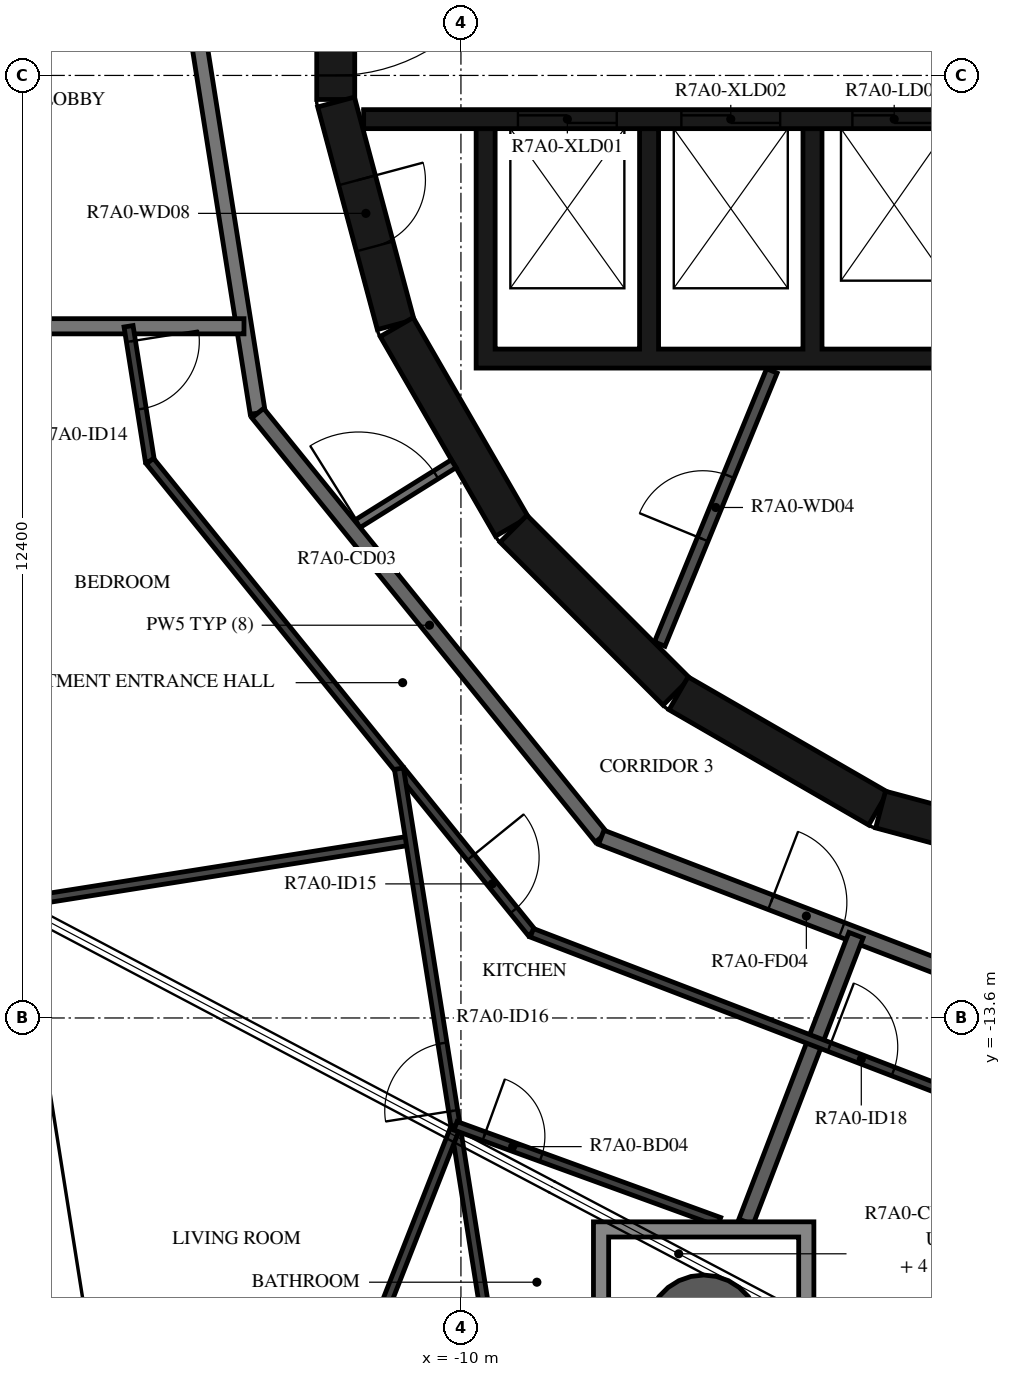
"""IFC4 building model, lengths in metres.
Left out: names, types, materials, properties, quantities, classifications, styles, units other than length and angle.
Written with IfcOpenShell. Run it as: python <this file> out.ifc"""

import sys

from ifc_helpers import new_model, si_unit, direction, frame, frame_2d, origin, origin_2d, place, context, subcontext, project, spatial, polyline, rectangle, hollow_circle, outline, extrude, element, fill, save


model = new_model("IFC4")
c1 = context("Model", 3, precision=1e-05, world=origin(), true_north=direction((0.0, 1.0)))
c2 = subcontext(c1, "Body", "Model", "MODEL_VIEW")
j1 = project(units=[si_unit("LENGTHUNIT", "METRE"), si_unit("PLANEANGLEUNIT", "RADIAN")], contexts=[c1])
p1 = place(None, origin())
s1 = spatial("IfcSite", under=j1, at=p1, CompositionType="ELEMENT")
p2 = place(p1, origin())
s2 = spatial("IfcBuilding", under=s1, at=p2, CompositionType="ELEMENT")
p3 = place(p2, frame((0.0, 0.0, 270.4)))
s3 = spatial("IfcBuildingStorey", under=s2, at=p3, CompositionType="ELEMENT", Elevation=270.4)
p4 = place(p3, frame((-6.807, -17.732, -0.38), z_axis=(0.0, 0.0, 1.0), x_axis=(1.0, 0.0, 0.0)))
e1 = element("IfcColumn", 1, at=p4, inside=s3, PredefinedType="COLUMN", context=c2, shape_type="SweptSolid", body=[
    extrude(hollow_circle(Radius=0.75, WallThickness=0.035, at=origin_2d()), origin(), (0.0, 0.0, 1.0), 3.5),
])
p5 = place(p3, frame((-11.647, 1.516, 0.0), z_axis=(0.0, 0.0, 1.0), x_axis=(0.0, -1.0, 0.0)))
e2 = element("IfcWall", 2, at=p5, inside=s3, PredefinedType="SHEAR", context=c2, shape_type="SweptSolid", body=[
    extrude(rectangle(XDim=3.033, YDim=0.5, at=frame_2d((1.516, 0.0))), origin(), (0.0, 0.0, 1.0), 3.12),
])
p6 = place(p5, frame((0.316, 0.0, 0.0)))
e3 = element("IfcOpeningElement", 3, at=p6, cuts=e2, PredefinedType="OPENING", context=c2, shape_type="SweptSolid", body=[
    extrude(rectangle(XDim=2.4, YDim=2.1, at=frame_2d((1.2, 1.05))), frame((0.0, 0.26, 0.0), z_axis=(0.0, -1.0, 0.0), x_axis=(1.0, 0.0, 0.0)), (0.0, 0.0, 1.0), 0.52),
])
p7 = place(p3, frame((-11.643, -1.55, 0.0), z_axis=(0.0, 0.0, 1.0), x_axis=(0.258734743916, -0.965948410781, 0.0)))
e4 = element("IfcWall", 4, at=p7, inside=s3, PredefinedType="SHEAR", context=c2, shape_type="SweptSolid", body=[
    extrude(rectangle(XDim=3.033, YDim=0.5, at=frame_2d((1.516, 0.0))), origin(), (0.0, 0.0, 1.0), 3.12),
])
p8 = place(p7, frame((1.066, 0.0, 0.0)))
e5 = element("IfcOpeningElement", 5, at=p8, cuts=e4, PredefinedType="OPENING", context=c2, shape_type="SweptSolid", body=[
    extrude(rectangle(XDim=0.9, YDim=2.1, at=frame_2d((0.45, 1.05))), frame((0.0, 0.26, 0.0), z_axis=(0.0, -1.0, 0.0), x_axis=(1.0, 0.0, 0.0)), (0.0, 0.0, 1.0), 0.52),
])
p9 = place(p3, frame((-10.845, -4.51, 0.0), z_axis=(0.0, 0.0, 1.0), x_axis=(0.500087131594, -0.865975092491, 0.0)))
e6 = element("IfcWall", 6, at=p9, inside=s3, PredefinedType="SHEAR", context=c2, shape_type="SweptSolid", body=[
    extrude(rectangle(XDim=3.033, YDim=0.5, at=frame_2d((1.516, 0.0))), origin(), (0.0, 0.0, 1.0), 3.12),
])
p10 = place(p3, frame((-9.308, -7.164, 0.0), z_axis=(0.0, 0.0, 1.0), x_axis=(0.707106781187, -0.707106781187, 0.0)))
e7 = element("IfcWall", 7, at=p10, inside=s3, PredefinedType="SHEAR", context=c2, shape_type="SweptSolid", body=[
    extrude(rectangle(XDim=3.032, YDim=0.5, at=frame_2d((1.516, 0.0))), origin(), (0.0, 0.0, 1.0), 3.12),
])
for number, where, z_axis, x_axis in (
    (8, (-7.137, -9.329, 0.0), (0.0, 0.0, 1.0), (0.866, -0.5, 0.0)),
    (9, (-4.479, -10.858, 0.0), (0.0, 0.0, 1.0), (0.966, -0.259, 0.0)),
):
    element("IfcWall", number, at=place(p3, frame(where, z_axis=z_axis, x_axis=x_axis)), inside=s3, PredefinedType="SHEAR", context=c2, shape_type="SweptSolid", body=[
        extrude(rectangle(XDim=3.033, YDim=0.5, at=frame_2d((1.516, 0.0))), origin(), (0.0, 0.0, 1.0), 3.12),
    ])
p11 = place(p3, origin())
e10 = element("IfcWall", 10, at=p11, inside=s3, PredefinedType="SHEAR", context=c2, shape_type="SweptSolid", body=[
    extrude(outline(polyline([(9.8, -5.05), (9.8, -4.8), (9.8, -1.9), (9.55, -1.9), (9.55, -4.8), (7.65, -4.8), (7.65, -1.9), (7.4, -1.9), (7.4, -4.8), (5.5, -4.8), (5.5, -1.9), (5.25, -1.9), (5.25, -4.8), (3.35, -4.8), (3.35, -1.9), (3.1, -1.9), (3.1, -4.8), (1.2, -4.8), (1.2, -1.9), (0.95, -1.9), (0.95, -4.8), (-0.95, -4.8), (-0.95, -1.9), (-1.2, -1.9), (-1.2, -4.8), (-3.1, -4.8), (-3.1, -1.9), (-3.35, -1.9), (-3.35, -4.8), (-5.25, -4.8), (-5.25, -1.9), (-5.5, -1.9), (-5.5, -4.8), (-7.4, -4.8), (-7.4, -1.9), (-7.65, -1.9), (-7.65, -4.8), (-9.55, -4.8), (-9.55, -1.9), (-9.8, -1.9), (-9.8, -4.8), (-9.8, -5.05), (9.8, -5.05)])), origin(), (0.0, 0.0, 1.0), 3.12),
])
p12 = place(p3, frame((-11.28, -1.775, 0.0), z_axis=(0.0, 0.0, 1.0), x_axis=(1.0, 0.0, 0.0)))
e11 = element("IfcWall", 11, at=p12, inside=s3, PredefinedType="SHEAR", context=c2, shape_type="SweptSolid", body=[
    extrude(rectangle(XDim=14.38, YDim=0.25, at=frame_2d((7.19, 0.0))), origin(), (0.0, 0.0, 1.0), 3.12),
])
p13 = place(p12, frame((2.03, 0.0, 0.0)))
e12 = element("IfcOpeningElement", 12, at=p13, cuts=e11, PredefinedType="OPENING", context=c2, shape_type="SweptSolid", body=[
    extrude(rectangle(XDim=1.3, YDim=2.1, at=frame_2d((0.65, 1.05))), frame((0.0, 0.135, 0.0), z_axis=(0.0, -1.0, 0.0), x_axis=(1.0, 0.0, 0.0)), (0.0, 0.0, 1.0), 0.27),
])
p14 = place(p12, frame((4.18, 0.0, 0.0)))
e13 = element("IfcOpeningElement", 13, at=p14, cuts=e11, PredefinedType="OPENING", context=c2, shape_type="SweptSolid", body=[
    extrude(rectangle(XDim=1.3, YDim=2.1, at=frame_2d((0.65, 1.05))), frame((0.0, 0.135, 0.0), z_axis=(0.0, -1.0, 0.0), x_axis=(1.0, 0.0, 0.0)), (0.0, 0.0, 1.0), 0.27),
])
p15 = place(p12, frame((6.43, 0.0, 0.0)))
e14 = element("IfcOpeningElement", 14, at=p15, cuts=e11, PredefinedType="OPENING", context=c2, shape_type="SweptSolid", body=[
    extrude(rectangle(XDim=1.1, YDim=2.1, at=frame_2d((0.55, 1.05))), frame((0.0, 0.135, 0.0), z_axis=(0.0, -1.0, 0.0), x_axis=(1.0, 0.0, 0.0)), (0.0, 0.0, 1.0), 0.27),
])
p16 = place(p12, frame((8.58, 0.0, 0.0)))
e15 = element("IfcOpeningElement", 15, at=p16, cuts=e11, PredefinedType="OPENING", context=c2, shape_type="SweptSolid", body=[
    extrude(rectangle(XDim=1.1, YDim=2.1, at=frame_2d((0.55, 1.05))), frame((0.0, 0.135, 0.0), z_axis=(0.0, -1.0, 0.0), x_axis=(1.0, 0.0, 0.0)), (0.0, 0.0, 1.0), 0.27),
])
p17 = place(p12, frame((10.73, 0.0, 0.0)))
e16 = element("IfcOpeningElement", 16, at=p17, cuts=e11, PredefinedType="OPENING", context=c2, shape_type="SweptSolid", body=[
    extrude(rectangle(XDim=1.1, YDim=2.1, at=frame_2d((0.55, 1.05))), frame((0.0, 0.135, 0.0), z_axis=(0.0, -1.0, 0.0), x_axis=(1.0, 0.0, 0.0)), (0.0, 0.0, 1.0), 0.27),
])
p18 = place(p12, frame((12.98, 0.0, 0.0)))
e17 = element("IfcOpeningElement", 17, at=p18, cuts=e11, PredefinedType="OPENING", context=c2, shape_type="SweptSolid", body=[
    extrude(rectangle(XDim=0.9, YDim=2.1, at=frame_2d((0.45, 1.05))), frame((0.0, 0.135, 0.0), z_axis=(0.0, -1.0, 0.0), x_axis=(1.0, 0.0, 0.0)), (0.0, 0.0, 1.0), 0.27),
])
p19 = place(p3, frame((-7.385, -8.681, 0.0), z_axis=(0.0, 0.0, 1.0), x_axis=(0.379804590409, 0.925066739811, 0.0)))
e18 = element("IfcWall", 18, at=p19, inside=s3, PredefinedType="PARTITIONING", context=c2, shape_type="SweptSolid", body=[
    extrude(rectangle(XDim=3.885, YDim=0.15, at=frame_2d((1.942, 0.0))), origin(), (0.0, 0.0, 1.0), 3.12),
])
p20 = place(p19, frame((1.493, 0.0, 0.0)))
e19 = element("IfcOpeningElement", 19, at=p20, cuts=e18, PredefinedType="OPENING", context=c2, shape_type="SweptSolid", body=[
    extrude(rectangle(XDim=0.9, YDim=2.1, at=frame_2d((0.45, 1.05))), frame((0.0, 0.085, 0.0), z_axis=(0.0, -1.0, 0.0), x_axis=(1.0, 0.0, 0.0)), (0.0, 0.0, 1.0), 0.17),
])
p21 = place(p3, frame((-11.449, -7.154, 0.0), z_axis=(0.0, 0.0, 1.0), x_axis=(0.848067047543, 0.529888934468, 0.0)))
e20 = element("IfcWall", 20, at=p21, inside=s3, PredefinedType="PARTITIONING", context=c2, shape_type="SweptSolid", body=[
    extrude(rectangle(XDim=1.596, YDim=0.12, at=frame_2d((0.798, 0.0))), origin(), (0.0, 0.0, 1.0), 3.12),
])
p22 = place(p21, frame((0.12, 0.0, 0.0)))
e21 = element("IfcOpeningElement", 21, at=p22, cuts=e20, PredefinedType="OPENING", context=c2, shape_type="SweptSolid", body=[
    extrude(rectangle(XDim=1.2, YDim=2.1, at=frame_2d((0.6, 1.05))), frame((0.0, 0.07, 0.0), z_axis=(0.0, -1.0, 0.0), x_axis=(1.0, 0.0, 0.0)), (0.0, 0.0, 1.0), 0.14),
])
p23 = place(p3, frame((-13.797, 1.45, 0.0), z_axis=(0.0, 0.0, 1.0), x_axis=(0.156421704315, -0.987690361611, 0.0)))
e22 = element("IfcWall", 22, at=p23, inside=s3, PredefinedType="STANDARD", context=c2, shape_type="SweptSolid", body=[
    extrude(rectangle(XDim=7.181, YDim=0.2, at=frame_2d((3.591, 0.0))), origin(), (0.0, 0.0, 1.0), 3.12),
])
p24 = place(p3, frame((-12.673, -5.643, 0.0), z_axis=(0.0, 0.0, 1.0), x_axis=(0.629302871585, -0.777160148113, 0.0)))
e23 = element("IfcWall", 23, at=p24, inside=s3, PredefinedType="STANDARD", context=c2, shape_type="SweptSolid", body=[
    extrude(rectangle(XDim=7.181, YDim=0.2, at=frame_2d((3.59, 0.0))), origin(), (0.0, 0.0, 1.0), 3.12),
])
p25 = place(p3, frame((-8.154, -11.223, 0.0), z_axis=(0.0, 0.0, 1.0), x_axis=(0.93359073609, -0.358341090983, 0.0)))
e24 = element("IfcWall", 24, at=p25, inside=s3, PredefinedType="STANDARD", context=c2, shape_type="SweptSolid", body=[
    extrude(rectangle(XDim=7.181, YDim=0.2, at=frame_2d((3.59, 0.0))), origin(), (0.0, 0.0, 1.0), 3.12),
])
p26 = place(p25, frame((2.39, 0.0, 0.0)))
e25 = element("IfcOpeningElement", 25, at=p26, cuts=e24, PredefinedType="OPENING", context=c2, shape_type="SweptSolid", body=[
    extrude(rectangle(XDim=1.0, YDim=2.1, at=frame_2d((0.5, 1.05))), frame((0.0, 0.11, 0.0), z_axis=(0.0, -1.0, 0.0), x_axis=(1.0, 0.0, 0.0)), (0.0, 0.0, 1.0), 0.22),
])
p27 = place(p3, frame((-17.002, -4.5, 0.0), z_axis=(0.0, 0.0, 1.0), x_axis=(1.0, 0.0, 0.0)))
e26 = element("IfcWall", 26, at=p27, inside=s3, PredefinedType="STANDARD", context=c2, shape_type="SweptSolid", body=[
    extrude(rectangle(XDim=4.148, YDim=0.2, at=frame_2d((2.074, 0.0))), origin(), (0.0, 0.0, 1.0), 3.12),
])
p28 = place(p3, frame((-6.25, -16.282, 0.0), z_axis=(0.0, 0.0, 1.0), x_axis=(0.358351333512, 0.933586804625, 0.0)))
e27 = element("IfcWall", 27, at=p28, inside=s3, PredefinedType="STANDARD", context=c2, shape_type="SweptSolid", body=[
    extrude(rectangle(XDim=4.04, YDim=0.2, at=frame_2d((2.02, 0.0))), origin(), (0.0, 0.0, 1.0), 3.12),
])
p29 = place(p3, frame((-14.373, -4.5, 0.0), z_axis=(0.0, 0.0, 1.0), x_axis=(0.156437152886, -0.987687914878, 0.0)))
e28 = element("IfcWall", 28, at=p29, inside=s3, PredefinedType="PARTITIONING", context=c2, shape_type="SweptSolid", body=[
    extrude(rectangle(XDim=1.796, YDim=0.12, at=frame_2d((0.898, 0.0))), origin(), (0.0, 0.0, 1.0), 3.12),
])
p30 = place(p29, frame((0.2, 0.0, 0.0)))
e29 = element("IfcOpeningElement", 29, at=p30, cuts=e28, PredefinedType="OPENING", context=c2, shape_type="SweptSolid", body=[
    extrude(rectangle(XDim=0.9, YDim=2.1, at=frame_2d((0.45, 1.05))), frame((0.0, 0.07, 0.0), z_axis=(0.0, -1.0, 0.0), x_axis=(1.0, 0.0, 0.0)), (0.0, 0.0, 1.0), 0.14),
])
p31 = place(p3, frame((-14.092, -6.274, 0.0), z_axis=(0.0, 0.0, 1.0), x_axis=(0.62933367237, -0.777135206268, 0.0)))
e30 = element("IfcWall", 30, at=p31, inside=s3, PredefinedType="PARTITIONING", context=c2, shape_type="SweptSolid", body=[
    extrude(rectangle(XDim=7.985, YDim=0.12, at=frame_2d((3.992, 0.0))), origin(), (0.0, 0.0, 1.0), 3.12),
])
p32 = place(p31, frame((6.707, 0.0, 0.0)))
e31 = element("IfcOpeningElement", 31, at=p32, cuts=e30, PredefinedType="OPENING", context=c2, shape_type="SweptSolid", body=[
    extrude(rectangle(XDim=0.9, YDim=2.1, at=frame_2d((0.45, 1.05))), frame((0.0, 0.07, 0.0), z_axis=(0.0, -1.0, 0.0), x_axis=(1.0, 0.0, 0.0)), (0.0, 0.0, 1.0), 0.14),
])
p33 = place(p3, frame((-9.067, -12.479, 0.0), z_axis=(0.0, 0.0, 1.0), x_axis=(0.933579449035, -0.358370495911, 0.0)))
e32 = element("IfcWall", 32, at=p33, inside=s3, PredefinedType="PARTITIONING", context=c2, shape_type="SweptSolid", body=[
    extrude(rectangle(XDim=7.985, YDim=0.12, at=frame_2d((3.992, 0.0))), origin(), (0.0, 0.0, 1.0), 3.12),
])
p34 = place(p33, frame((4.192, 0.0, 0.0)))
e33 = element("IfcOpeningElement", 33, at=p34, cuts=e32, PredefinedType="OPENING", context=c2, shape_type="SweptSolid", body=[
    extrude(rectangle(XDim=0.9, YDim=2.1, at=frame_2d((0.45, 1.05))), frame((0.0, 0.07, 0.0), z_axis=(0.0, -1.0, 0.0), x_axis=(1.0, 0.0, 0.0)), (0.0, 0.0, 1.0), 0.14),
])
p35 = place(p3, frame((-15.802, -12.08, 0.0), z_axis=(0.0, 0.0, 1.0), x_axis=(0.987687857978, 0.156437512135, 0.0)))
e34 = element("IfcWall", 34, at=p35, inside=s3, PredefinedType="PARTITIONING", context=c2, shape_type="SweptSolid", body=[
    extrude(rectangle(XDim=5.2, YDim=0.12, at=frame_2d((2.6, 0.0))), origin(), (0.0, 0.0, 1.0), 2.73),
])
p36 = place(p3, frame((-9.619, -17.871, 0.0), z_axis=(0.0, 0.0, 1.0), x_axis=(-0.156433255633, 0.987688532146, 0.0)))
e35 = element("IfcWall", 35, at=p36, inside=s3, PredefinedType="PARTITIONING", context=c2, shape_type="SweptSolid", body=[
    extrude(rectangle(XDim=7.644, YDim=0.12, at=frame_2d((3.822, 0.0))), origin(), (0.0, 0.0, 1.0), 3.12),
])
p37 = place(p36, frame((3.087, 0.0, 0.0)))
e36 = element("IfcOpeningElement", 36, at=p37, cuts=e35, PredefinedType="OPENING", context=c2, shape_type="SweptSolid", body=[
    extrude(rectangle(XDim=0.9, YDim=2.1, at=frame_2d((0.45, 1.05))), frame((0.0, 0.07, 0.0), z_axis=(0.0, -1.0, 0.0), x_axis=(1.0, 0.0, 0.0)), (0.0, 0.0, 1.0), 0.14),
])
p38 = place(p3, frame((-13.067, -22.658, 0.0), z_axis=(0.0, 0.0, 1.0), x_axis=(0.365785999331, 0.930698986082, 0.0)))
e37 = element("IfcWall", 37, at=p38, inside=s3, PredefinedType="PARTITIONING", context=c2, shape_type="SweptSolid", body=[
    extrude(rectangle(XDim=8.196, YDim=0.12, at=frame_2d((4.098, 0.0))), origin(), (0.0, 0.0, 1.0), 3.12),
])
p39 = place(p38, frame((0.5, 0.0, 0.0)))
e38 = element("IfcOpeningElement", 38, at=p39, cuts=e37, PredefinedType="OPENING", context=c2, shape_type="SweptSolid", body=[
    extrude(rectangle(XDim=0.9, YDim=2.1, at=frame_2d((0.45, 1.05))), frame((0.0, 0.07, 0.0), z_axis=(0.0, -1.0, 0.0), x_axis=(1.0, 0.0, 0.0)), (0.0, 0.0, 1.0), 0.14),
])
p40 = place(p3, frame((-10.071, -15.019, 0.0), z_axis=(0.0, 0.0, 1.0), x_axis=(0.939648507355, -0.34214131967, 0.0)))
e39 = element("IfcWall", 39, at=p40, inside=s3, PredefinedType="PARTITIONING", context=c2, shape_type="SweptSolid", body=[
    extrude(rectangle(XDim=3.691, YDim=0.12, at=frame_2d((1.846, 0.0))), origin(), (0.0, 0.0, 1.0), 3.12),
])
p41 = place(p40, frame((0.4, 0.0, 0.0)))
e40 = element("IfcOpeningElement", 40, at=p41, cuts=e39, PredefinedType="OPENING", context=c2, shape_type="SweptSolid", body=[
    extrude(rectangle(XDim=0.8, YDim=2.1, at=frame_2d((0.4, 1.05))), frame((0.0, 0.07, 0.0), z_axis=(0.0, -1.0, 0.0), x_axis=(1.0, 0.0, 0.0)), (0.0, 0.0, 1.0), 0.14),
])
p42 = place(p3, frame((-3.875, -21.019, 0.0), z_axis=(0.0, 0.0, 1.0), x_axis=(0.777149096542, 0.629316519523, 0.0)))
e41 = element("IfcWall", 41, at=p42, inside=s3, PredefinedType="PARTITIONING", context=c2, shape_type="SweptSolid", body=[
    extrude(rectangle(XDim=10.508, YDim=0.12, at=frame_2d((5.254, 0.0))), origin(), (0.0, 0.0, 1.0), 3.12),
])
p43 = place(p42, frame((1.23, 0.0, 0.0)))
e42 = element("IfcOpeningElement", 42, at=p43, cuts=e41, PredefinedType="OPENING", context=c2, shape_type="SweptSolid", body=[
    extrude(rectangle(XDim=0.9, YDim=2.1, at=frame_2d((0.45, 1.05))), frame((0.0, 0.07, 0.0), z_axis=(0.0, -1.0, 0.0), x_axis=(1.0, 0.0, 0.0)), (0.0, 0.0, 1.0), 0.14),
])
p44 = place(p3, origin())
e43 = element("IfcWall", 43, at=p44, inside=s3, PredefinedType="STANDARD", context=c2, shape_type="SweptSolid", body=[
    extrude(outline(polyline([(-5.357, -16.282), (-5.357, -19.182), (-8.257, -19.182), (-8.257, -16.282), (-5.357, -16.282)]), holes=[polyline([(-8.057, -18.982), (-5.557, -18.982), (-5.557, -16.482), (-8.057, -16.482), (-8.057, -18.982)])]), origin(), (0.0, 0.0, 1.0), 3.12),
])
p45 = place(p6, origin())
e44 = element("IfcDoor", 44, at=p45, inside=s3, OperationType="DOUBLE_DOOR_SINGLE_SWING", PredefinedType="DOOR", context=c2, shape_type="SweptSolid", body=[
    extrude(rectangle(XDim=2.4, YDim=2.1, at=frame_2d((1.2, 1.05))), frame((0.0, 0.025, 0.0), z_axis=(0.0, -1.0, 0.0), x_axis=(1.0, 0.0, 0.0)), (0.0, 0.0, 1.0), 0.05),
])
fill(e3, e44)
p46 = place(p13, origin())
e45 = element("IfcDoor", 45, at=p46, inside=s3, OperationType="DOUBLE_DOOR_SLIDING", PredefinedType="DOOR", context=c2, shape_type="SweptSolid", body=[
    extrude(rectangle(XDim=1.3, YDim=2.1, at=frame_2d((0.65, 1.05))), frame((0.0, 0.025, 0.0), z_axis=(0.0, -1.0, 0.0), x_axis=(1.0, 0.0, 0.0)), (0.0, 0.0, 1.0), 0.05),
])
fill(e12, e45)
p47 = place(p14, origin())
e46 = element("IfcDoor", 46, at=p47, inside=s3, OperationType="DOUBLE_DOOR_SLIDING", PredefinedType="DOOR", context=c2, shape_type="SweptSolid", body=[
    extrude(rectangle(XDim=1.3, YDim=2.1, at=frame_2d((0.65, 1.05))), frame((0.0, 0.025, 0.0), z_axis=(0.0, -1.0, 0.0), x_axis=(1.0, 0.0, 0.0)), (0.0, 0.0, 1.0), 0.05),
])
fill(e13, e46)
p48 = place(p15, origin())
e47 = element("IfcDoor", 47, at=p48, inside=s3, OperationType="DOUBLE_DOOR_SLIDING", PredefinedType="DOOR", context=c2, shape_type="SweptSolid", body=[
    extrude(rectangle(XDim=1.1, YDim=2.1, at=frame_2d((0.55, 1.05))), frame((0.0, 0.025, 0.0), z_axis=(0.0, -1.0, 0.0), x_axis=(1.0, 0.0, 0.0)), (0.0, 0.0, 1.0), 0.05),
])
fill(e14, e47)
p49 = place(p20, origin())
e48 = element("IfcDoor", 48, at=p49, inside=s3, OperationType="SINGLE_SWING_RIGHT", PredefinedType="DOOR", context=c2, shape_type="SweptSolid", body=[
    extrude(rectangle(XDim=0.9, YDim=2.1, at=frame_2d((0.45, 1.05))), frame((0.0, 0.025, 0.0), z_axis=(0.0, -1.0, 0.0), x_axis=(1.0, 0.0, 0.0)), (0.0, 0.0, 1.0), 0.05),
])
fill(e19, e48)
p50 = place(p8, origin())
e49 = element("IfcDoor", 49, at=p50, inside=s3, OperationType="SINGLE_SWING_RIGHT", PredefinedType="DOOR", context=c2, shape_type="SweptSolid", body=[
    extrude(rectangle(XDim=0.9, YDim=2.1, at=frame_2d((0.45, 1.05))), frame((0.0, 0.025, 0.0), z_axis=(0.0, -1.0, 0.0), x_axis=(1.0, 0.0, 0.0)), (0.0, 0.0, 1.0), 0.05),
])
fill(e5, e49)
p51 = place(p26, origin())
e50 = element("IfcDoor", 50, at=p51, inside=s3, OperationType="SINGLE_SWING_RIGHT", PredefinedType="DOOR", context=c2, shape_type="SweptSolid", body=[
    extrude(rectangle(XDim=1.0, YDim=2.1, at=frame_2d((0.5, 1.05))), frame((0.0, 0.025, 0.0), z_axis=(0.0, -1.0, 0.0), x_axis=(1.0, 0.0, 0.0)), (0.0, 0.0, 1.0), 0.05),
])
fill(e25, e50)
p52 = place(p30, origin())
e51 = element("IfcDoor", 51, at=p52, inside=s3, OperationType="SINGLE_SWING_RIGHT", PredefinedType="DOOR", context=c2, shape_type="SweptSolid", body=[
    extrude(rectangle(XDim=0.9, YDim=2.1, at=frame_2d((0.45, 1.05))), frame((0.0, 0.025, 0.0), z_axis=(0.0, -1.0, 0.0), x_axis=(1.0, 0.0, 0.0)), (0.0, 0.0, 1.0), 0.05),
])
fill(e29, e51)
p53 = place(p32, origin())
e52 = element("IfcDoor", 52, at=p53, inside=s3, OperationType="SINGLE_SWING_RIGHT", PredefinedType="DOOR", context=c2, shape_type="SweptSolid", body=[
    extrude(rectangle(XDim=0.9, YDim=2.1, at=frame_2d((0.45, 1.05))), frame((0.0, 0.025, 0.0), z_axis=(0.0, -1.0, 0.0), x_axis=(1.0, 0.0, 0.0)), (0.0, 0.0, 1.0), 0.05),
])
fill(e31, e52)
p54 = place(p37, origin())
e53 = element("IfcDoor", 53, at=p54, inside=s3, OperationType="SINGLE_SWING_RIGHT", PredefinedType="DOOR", context=c2, shape_type="SweptSolid", body=[
    extrude(rectangle(XDim=0.9, YDim=2.1, at=frame_2d((0.45, 1.05))), frame((0.0, 0.025, 0.0), z_axis=(0.0, -1.0, 0.0), x_axis=(1.0, 0.0, 0.0)), (0.0, 0.0, 1.0), 0.05),
])
fill(e36, e53)
p55 = place(p41, origin())
e54 = element("IfcDoor", 54, at=p55, inside=s3, OperationType="SINGLE_SWING_RIGHT", PredefinedType="DOOR", context=c2, shape_type="SweptSolid", body=[
    extrude(rectangle(XDim=0.8, YDim=2.1, at=frame_2d((0.4, 1.05))), frame((0.0, 0.025, 0.0), z_axis=(0.0, -1.0, 0.0), x_axis=(1.0, 0.0, 0.0)), (0.0, 0.0, 1.0), 0.05),
])
fill(e40, e54)
p56 = place(p34, origin())
e55 = element("IfcDoor", 55, at=p56, inside=s3, OperationType="SINGLE_SWING_RIGHT", PredefinedType="DOOR", context=c2, shape_type="SweptSolid", body=[
    extrude(rectangle(XDim=0.9, YDim=2.1, at=frame_2d((0.45, 1.05))), frame((0.0, 0.025, 0.0), z_axis=(0.0, -1.0, 0.0), x_axis=(1.0, 0.0, 0.0)), (0.0, 0.0, 1.0), 0.05),
])
fill(e33, e55)
p57 = place(p22, origin())
e56 = element("IfcDoor", 56, at=p57, inside=s3, OperationType="DOUBLE_DOOR_SINGLE_SWING", PredefinedType="DOOR", context=c2, shape_type="SweptSolid", body=[
    extrude(rectangle(XDim=1.2, YDim=2.1, at=frame_2d((0.6, 1.05))), frame((0.0, 0.025, 0.0), z_axis=(0.0, -1.0, 0.0), x_axis=(1.0, 0.0, 0.0)), (0.0, 0.0, 1.0), 0.05),
])
fill(e21, e56)
save(model, sys.argv[1])
